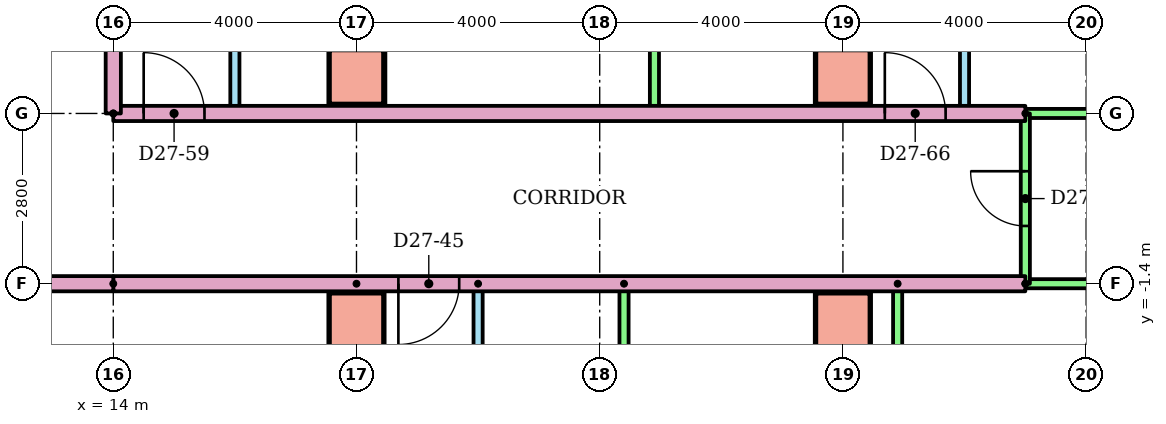
"""IFC4 building model, lengths in metres.
Left out: names, types, materials, properties, quantities, classifications, styles, units other than length and angle.
Written with IfcOpenShell. Run it as: python <this file> out.ifc"""

import sys

from ifc_helpers import new_model, si_unit, direction, frame, frame_2d, origin, origin_2d, place, context, subcontext, project, spatial, rectangle, extrude, element, fill, save


model = new_model("IFC4")
c1 = context("Model", 3, precision=1e-05, world=origin(), true_north=direction((0.0, 1.0)))
c2 = subcontext(c1, "Body", "Model", "MODEL_VIEW")
j1 = project(units=[si_unit("LENGTHUNIT", "METRE"), si_unit("PLANEANGLEUNIT", "RADIAN")], contexts=[c1])
p1 = place(None, origin())
s1 = spatial("IfcSite", under=j1, at=p1, CompositionType="ELEMENT")
p2 = place(p1, origin())
s2 = spatial("IfcBuilding", under=s1, at=p2, CompositionType="ELEMENT")
p3 = place(p2, frame((0.0, 0.0, 103.1)))
s3 = spatial("IfcBuildingStorey", under=s2, at=p3, CompositionType="ELEMENT", Elevation=103.1)
for number, where in (
    (1, (18.0, -2.0, 0.0)),
    (2, (26.0, -2.0, 0.0)),
    (3, (18.0, 2.0, 0.0)),
    (4, (26.0, 2.0, 0.0)),
):
    element("IfcColumn", number, at=place(p3, frame(where)), inside=s3, PredefinedType="COLUMN", context=c2, shape_type="SweptSolid", body=[
        extrude(rectangle(XDim=0.9, YDim=0.9, at=origin_2d()), origin(), (0.0, 0.0, 1.0), 3.2),
    ])
p4 = place(p3, frame((20.0, -1.4, 0.0), z_axis=(0.0, 0.0, 1.0), x_axis=(0.0, -1.0, 0.0)))
e5 = element("IfcWall", 5, at=p4, inside=s3, PredefinedType="PARTITIONING", context=c2, shape_type="SweptSolid", body=[
    extrude(rectangle(XDim=5.3, YDim=0.15, at=frame_2d((2.65, 0.0))), origin(), (0.0, 0.0, 1.0), 2.4),
])
p5 = place(p4, frame((1.05, 0.0, 0.0)))
e6 = element("IfcOpeningElement", 6, at=p5, cuts=e5, PredefinedType="OPENING", context=c2, shape_type="SweptSolid", body=[
    extrude(rectangle(XDim=0.9, YDim=2.1, at=frame_2d((0.45, 1.05))), frame((0.0, 0.085, 0.0), z_axis=(0.0, -1.0, 0.0), x_axis=(1.0, 0.0, 0.0)), (0.0, 0.0, 1.0), 0.17),
])
p6 = place(p4, frame((3.75, 0.0, 0.0)))
e7 = element("IfcOpeningElement", 7, at=p6, cuts=e5, PredefinedType="OPENING", context=c2, shape_type="SweptSolid", body=[
    extrude(rectangle(XDim=0.8, YDim=2.1, at=frame_2d((0.4, 1.05))), frame((0.0, 0.085, 0.0), z_axis=(0.0, -1.0, 0.0), x_axis=(1.0, 0.0, 0.0)), (0.0, 0.0, 1.0), 0.17),
])
for number, where, z_axis, x_axis in (
    (8, (22.4, -1.4, 0.0), (0.0, 0.0, 1.0), (0.0, -1.0, 0.0)),
    (9, (26.9, -1.4, 0.0), (0.0, 0.0, 1.0), (0.0, -1.0, 0.0)),
):
    element("IfcWall", number, at=place(p3, frame(where, z_axis=z_axis, x_axis=x_axis)), inside=s3, PredefinedType="PARTITIONING", context=c2, shape_type="SweptSolid", body=[
        extrude(rectangle(XDim=5.3, YDim=0.15, at=frame_2d((2.65, 0.0))), origin(), (0.0, 0.0, 1.0), 2.4),
    ])
p7 = place(p3, frame((18.0, -1.4, 0.0), z_axis=(0.0, 0.0, 1.0), x_axis=(0.0, -1.0, 0.0)))
e10 = element("IfcWall", 10, at=p7, inside=s3, PredefinedType="PARTITIONING", context=c2, shape_type="SweptSolid", body=[
    extrude(rectangle(XDim=14.81, YDim=0.25, at=frame_2d((7.405, 0.0))), origin(), (0.0, 0.0, 1.0), 2.4),
])
p8 = place(p3, frame((29.0, -1.4, 0.0), z_axis=(0.0, 0.0, 1.0), x_axis=(-1.0, 0.0, 0.0)))
e11 = element("IfcWall", 11, at=p8, inside=s3, PredefinedType="PARTITIONING", context=c2, shape_type="SweptSolid", body=[
    extrude(rectangle(XDim=15.0, YDim=0.25, at=frame_2d((7.5, 0.0))), origin(), (0.0, 0.0, 1.0), 2.4),
])
p9 = place(p8, frame((9.311, 0.0, 0.0)))
e12 = element("IfcOpeningElement", 12, at=p9, cuts=e11, PredefinedType="OPENING", context=c2, shape_type="SweptSolid", body=[
    extrude(rectangle(XDim=1.0, YDim=2.1, at=frame_2d((0.5, 1.05))), frame((0.0, 0.135, 0.0), z_axis=(0.0, -1.0, 0.0), x_axis=(1.0, 0.0, 0.0)), (0.0, 0.0, 1.0), 0.27),
])
p10 = place(p3, frame((40.62, -1.4, 0.0), z_axis=(0.0, 0.0, 1.0), x_axis=(-1.0, 0.0, 0.0)))
e13 = element("IfcWall", 13, at=p10, inside=s3, PredefinedType="PARTITIONING", context=c2, shape_type="SweptSolid", body=[
    extrude(rectangle(XDim=11.62, YDim=0.15, at=frame_2d((5.81, 0.0))), origin(), (0.0, 0.0, 1.0), 2.4),
])
p11 = place(p3, frame((16.0, 9.1, 0.0), z_axis=(0.0, 0.0, 1.0), x_axis=(0.0, -1.0, 0.0)))
e14 = element("IfcWall", 14, at=p11, inside=s3, PredefinedType="PARTITIONING", context=c2, shape_type="SweptSolid", body=[
    extrude(rectangle(XDim=7.7, YDim=0.15, at=frame_2d((3.85, 0.0))), origin(), (0.0, 0.0, 1.0), 2.4),
])
p12 = place(p11, frame((5.125, 0.0, 0.0)))
e15 = element("IfcOpeningElement", 15, at=p12, cuts=e14, PredefinedType="OPENING", context=c2, shape_type="SweptSolid", body=[
    extrude(rectangle(XDim=0.9, YDim=2.1, at=frame_2d((0.45, 1.05))), frame((0.0, 0.085, 0.0), z_axis=(0.0, -1.0, 0.0), x_axis=(1.0, 0.0, 0.0)), (0.0, 0.0, 1.0), 0.17),
])
p13 = place(p11, frame((1.325, 0.0, 0.0)))
e16 = element("IfcOpeningElement", 16, at=p13, cuts=e14, PredefinedType="OPENING", context=c2, shape_type="SweptSolid", body=[
    extrude(rectangle(XDim=0.8, YDim=2.1, at=frame_2d((0.4, 1.05))), frame((0.0, 0.085, 0.0), z_axis=(0.0, -1.0, 0.0), x_axis=(1.0, 0.0, 0.0)), (0.0, 0.0, 1.0), 0.17),
])
for number, where, z_axis, x_axis in (
    (17, (18.4, 9.1, 0.0), (0.0, 0.0, 1.0), (0.0, -1.0, 0.0)),
    (18, (22.9, 9.1, 0.0), (0.0, 0.0, 1.0), (0.0, -1.0, 0.0)),
):
    element("IfcWall", number, at=place(p3, frame(where, z_axis=z_axis, x_axis=x_axis)), inside=s3, PredefinedType="PARTITIONING", context=c2, shape_type="SweptSolid", body=[
        extrude(rectangle(XDim=7.7, YDim=0.15, at=frame_2d((3.85, 0.0))), origin(), (0.0, 0.0, 1.0), 2.4),
    ])
p14 = place(p3, frame((28.0, 9.1, 0.0), z_axis=(0.0, 0.0, 1.0), x_axis=(0.0, -1.0, 0.0)))
e19 = element("IfcWall", 19, at=p14, inside=s3, PredefinedType="PARTITIONING", context=c2, shape_type="SweptSolid", body=[
    extrude(rectangle(XDim=7.7, YDim=0.15, at=frame_2d((3.85, 0.0))), origin(), (0.0, 0.0, 1.0), 2.4),
])
p15 = place(p14, frame((5.125, 0.0, 0.0)))
e20 = element("IfcOpeningElement", 20, at=p15, cuts=e19, PredefinedType="OPENING", context=c2, shape_type="SweptSolid", body=[
    extrude(rectangle(XDim=0.9, YDim=2.1, at=frame_2d((0.45, 1.05))), frame((0.0, 0.085, 0.0), z_axis=(0.0, -1.0, 0.0), x_axis=(1.0, 0.0, 0.0)), (0.0, 0.0, 1.0), 0.17),
])
p16 = place(p14, frame((1.325, 0.0, 0.0)))
e21 = element("IfcOpeningElement", 21, at=p16, cuts=e19, PredefinedType="OPENING", context=c2, shape_type="SweptSolid", body=[
    extrude(rectangle(XDim=0.8, YDim=2.1, at=frame_2d((0.4, 1.05))), frame((0.0, 0.085, 0.0), z_axis=(0.0, -1.0, 0.0), x_axis=(1.0, 0.0, 0.0)), (0.0, 0.0, 1.0), 0.17),
])
p17 = place(p3, frame((26.0, 18.621, 0.0), z_axis=(0.0, 0.0, 1.0), x_axis=(0.0, -1.0, 0.0)))
e22 = element("IfcWall", 22, at=p17, inside=s3, PredefinedType="PARTITIONING", context=c2, shape_type="SweptSolid", body=[
    extrude(rectangle(XDim=17.221, YDim=0.25, at=frame_2d((8.611, 0.0))), origin(), (0.0, 0.0, 1.0), 2.4),
])
p18 = place(p3, frame((14.0, 1.4, 0.0)))
e23 = element("IfcWall", 23, at=p18, inside=s3, PredefinedType="PARTITIONING", context=c2, shape_type="SweptSolid", body=[
    extrude(rectangle(XDim=15.0, YDim=0.25, at=frame_2d((7.5, 0.0))), origin(), (0.0, 0.0, 1.0), 2.4),
])
p19 = place(p18, frame((0.5, 0.0, 0.0)))
e24 = element("IfcOpeningElement", 24, at=p19, cuts=e23, PredefinedType="OPENING", context=c2, shape_type="SweptSolid", body=[
    extrude(rectangle(XDim=1.0, YDim=2.1, at=frame_2d((0.5, 1.05))), frame((0.0, 0.135, 0.0), z_axis=(0.0, -1.0, 0.0), x_axis=(1.0, 0.0, 0.0)), (0.0, 0.0, 1.0), 0.27),
])
p20 = place(p18, frame((12.689, 0.0, 0.0)))
e25 = element("IfcOpeningElement", 25, at=p20, cuts=e23, PredefinedType="OPENING", context=c2, shape_type="SweptSolid", body=[
    extrude(rectangle(XDim=1.0, YDim=2.1, at=frame_2d((0.5, 1.05))), frame((0.0, 0.135, 0.0), z_axis=(0.0, -1.0, 0.0), x_axis=(1.0, 0.0, 0.0)), (0.0, 0.0, 1.0), 0.27),
])
p21 = place(p3, frame((29.0, 1.4, 0.0)))
e26 = element("IfcWall", 26, at=p21, inside=s3, PredefinedType="PARTITIONING", context=c2, shape_type="SweptSolid", body=[
    extrude(rectangle(XDim=11.62, YDim=0.15, at=frame_2d((5.81, 0.0))), origin(), (0.0, 0.0, 1.0), 2.4),
])
p22 = place(p3, frame((29.0, -1.4, 0.0), z_axis=(0.0, 0.0, 1.0), x_axis=(0.0, 1.0, 0.0)))
e27 = element("IfcWall", 27, at=p22, inside=s3, PredefinedType="PARTITIONING", context=c2, shape_type="SweptSolid", body=[
    extrude(rectangle(XDim=2.8, YDim=0.15, at=frame_2d((1.4, 0.0))), origin(), (0.0, 0.0, 1.0), 2.4),
])
p23 = place(p22, frame((0.95, 0.0, 0.0)))
e28 = element("IfcOpeningElement", 28, at=p23, cuts=e27, PredefinedType="OPENING", context=c2, shape_type="SweptSolid", body=[
    extrude(rectangle(XDim=0.9, YDim=2.1, at=frame_2d((0.45, 1.05))), frame((0.0, 0.085, 0.0), z_axis=(0.0, -1.0, 0.0), x_axis=(1.0, 0.0, 0.0)), (0.0, 0.0, 1.0), 0.17),
])
p24 = place(p3, frame((14.0, -1.4, 0.0), z_axis=(0.0, 0.0, 1.0), x_axis=(-1.0, 0.0, 0.0)))
e29 = element("IfcWall", 29, at=p24, inside=s3, PredefinedType="PARTITIONING", context=c2, shape_type="SweptSolid", body=[
    extrude(rectangle(XDim=28.0, YDim=0.25, at=frame_2d((14.0, 0.0))), origin(), (0.0, 0.0, 1.0), 2.4),
])
p25 = place(p24, frame((20.689, 0.0, 0.0)))
e30 = element("IfcOpeningElement", 30, at=p25, cuts=e29, PredefinedType="OPENING", context=c2, shape_type="SweptSolid", body=[
    extrude(rectangle(XDim=1.0, YDim=2.1, at=frame_2d((0.5, 1.05))), frame((0.0, 0.135, 0.0), z_axis=(0.0, -1.0, 0.0), x_axis=(1.0, 0.0, 0.0)), (0.0, 0.0, 1.0), 0.27),
])
p26 = place(p24, frame((18.311, 0.0, 0.0)))
e31 = element("IfcOpeningElement", 31, at=p26, cuts=e29, PredefinedType="OPENING", context=c2, shape_type="SweptSolid", body=[
    extrude(rectangle(XDim=1.0, YDim=2.1, at=frame_2d((0.5, 1.05))), frame((0.0, 0.135, 0.0), z_axis=(0.0, -1.0, 0.0), x_axis=(1.0, 0.0, 0.0)), (0.0, 0.0, 1.0), 0.27),
])
p27 = place(p3, frame((14.0, 1.4, 0.0), z_axis=(0.0, 0.0, 1.0), x_axis=(0.0, 1.0, 0.0)))
e32 = element("IfcWall", 32, at=p27, inside=s3, PredefinedType="PARTITIONING", context=c2, shape_type="SweptSolid", body=[
    extrude(rectangle(XDim=1.6, YDim=0.25, at=frame_2d((0.8, 0.0))), origin(), (0.0, 0.0, 1.0), 2.4),
])
p28 = place(p9, origin())
e33 = element("IfcDoor", 33, at=p28, inside=s3, OperationType="SINGLE_SWING_RIGHT", PredefinedType="DOOR", context=c2, shape_type="SweptSolid", body=[
    extrude(rectangle(XDim=1.0, YDim=2.1, at=frame_2d((0.5, 1.05))), frame((0.0, 0.025, 0.0), z_axis=(0.0, -1.0, 0.0), x_axis=(1.0, 0.0, 0.0)), (0.0, 0.0, 1.0), 0.05),
])
fill(e12, e33)
p29 = place(p19, origin())
e34 = element("IfcDoor", 34, at=p29, inside=s3, OperationType="SINGLE_SWING_LEFT", PredefinedType="DOOR", context=c2, shape_type="SweptSolid", body=[
    extrude(rectangle(XDim=1.0, YDim=2.1, at=frame_2d((0.5, 1.05))), frame((0.0, 0.025, 0.0), z_axis=(0.0, -1.0, 0.0), x_axis=(1.0, 0.0, 0.0)), (0.0, 0.0, 1.0), 0.05),
])
fill(e24, e34)
p30 = place(p20, origin())
e35 = element("IfcDoor", 35, at=p30, inside=s3, OperationType="SINGLE_SWING_LEFT", PredefinedType="DOOR", context=c2, shape_type="SweptSolid", body=[
    extrude(rectangle(XDim=1.0, YDim=2.1, at=frame_2d((0.5, 1.05))), frame((0.0, 0.025, 0.0), z_axis=(0.0, -1.0, 0.0), x_axis=(1.0, 0.0, 0.0)), (0.0, 0.0, 1.0), 0.05),
])
fill(e25, e35)
p31 = place(p23, origin())
e36 = element("IfcDoor", 36, at=p31, inside=s3, OperationType="SINGLE_SWING_RIGHT", PredefinedType="DOOR", context=c2, shape_type="SweptSolid", body=[
    extrude(rectangle(XDim=0.9, YDim=2.1, at=frame_2d((0.45, 1.05))), frame((0.0, 0.025, 0.0), z_axis=(0.0, -1.0, 0.0), x_axis=(1.0, 0.0, 0.0)), (0.0, 0.0, 1.0), 0.05),
])
fill(e28, e36)
save(model, sys.argv[1])
